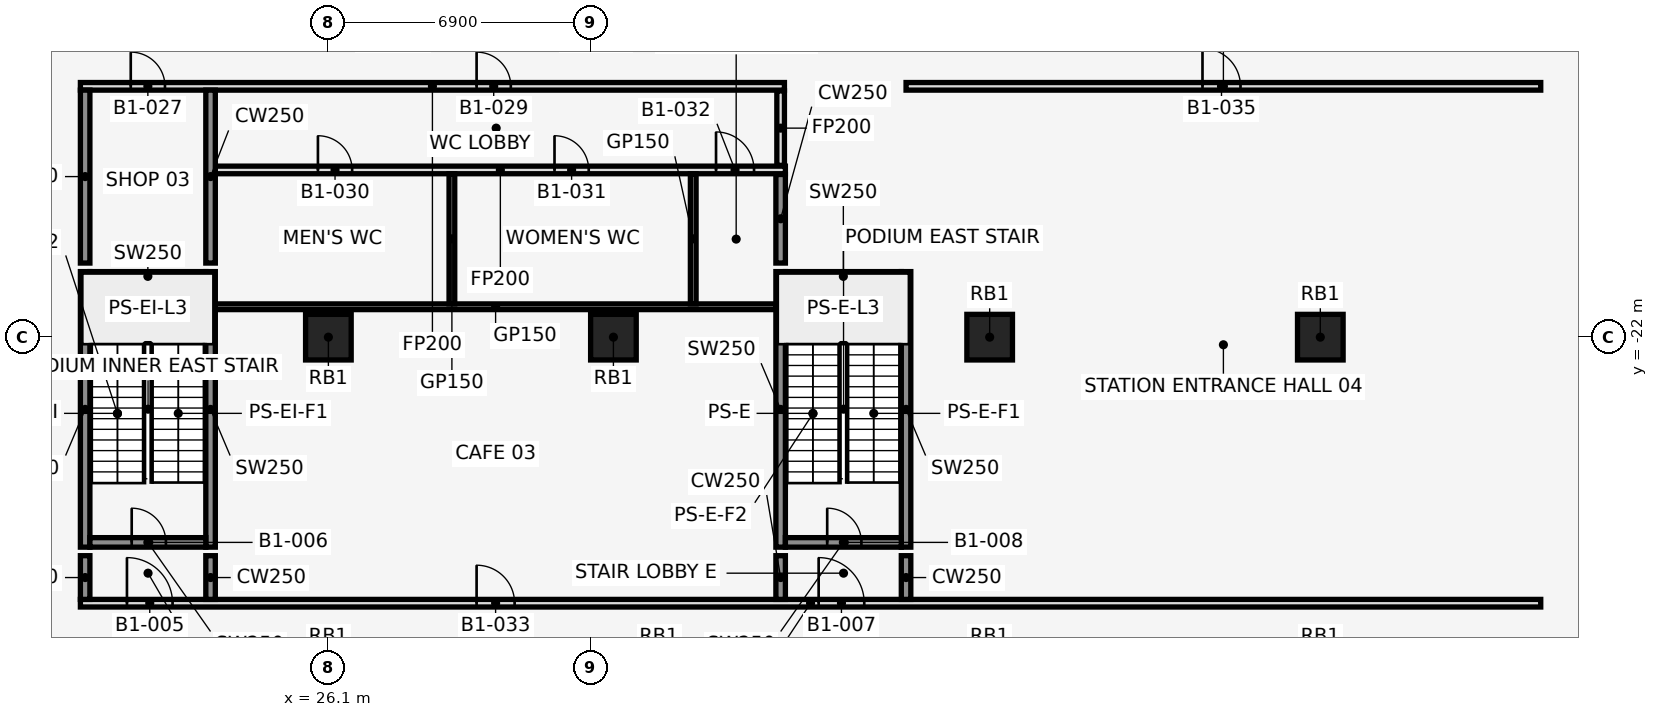
"""IFC4 building model, lengths in metres.
Left out: names, types, materials, properties, quantities, classifications, styles, units other than length and angle.
Written with IfcOpenShell. Run it as: python <this file> out.ifc"""

import sys

from ifc_helpers import new_model, si_unit, direction, frame, frame_2d, origin, origin_2d, place, context, subcontext, project, spatial, rectangle, extrude, element, fill, save


model = new_model("IFC4")
c1 = context("Model", 3, precision=1e-05, world=origin(), true_north=direction((0.0, 1.0)))
c2 = subcontext(c1, "Body", "Model", "MODEL_VIEW")
j1 = project(units=[si_unit("LENGTHUNIT", "METRE"), si_unit("PLANEANGLEUNIT", "RADIAN")], contexts=[c1])
p1 = place(None, origin())
s1 = spatial("IfcSite", under=j1, at=p1, CompositionType="ELEMENT")
p2 = place(p1, origin())
s2 = spatial("IfcBuilding", under=s1, at=p2, CompositionType="ELEMENT")
p3 = place(p2, frame((0.0, 0.0, -5.0)))
s3 = spatial("IfcBuildingStorey", under=s2, at=p3, CompositionType="ELEMENT", Elevation=-5.0)
for number, where, z_axis, x_axis in (
    (1, (33.6, -22.0, 0.0), (0.0, 0.0, 1.0), (1.0, 0.0, 0.0)),
    (2, (26.1, -22.0, 0.0), (0.0, 0.0, 1.0), (1.0, 0.0, 0.0)),
    (3, (43.5, -22.0, 0.0), (0.0, 0.0, 1.0), (1.0, 0.0, 0.0)),
    (4, (52.2, -22.0, 0.0), (0.0, 0.0, 1.0), (1.0, 0.0, 0.0)),
):
    element("IfcColumn", number, at=place(p3, frame(where, z_axis=z_axis, x_axis=x_axis)), inside=s3, PredefinedType="COLUMN", context=c2, shape_type="SweptSolid", body=[
        extrude(rectangle(XDim=1.2, YDim=1.2, at=origin_2d()), origin(), (0.0, 0.0, 1.0), 5.0),
    ])
for number, where, z_axis, x_axis in (
    (5, (19.7, -27.525, 0.0), (0.0, 0.0, 1.0), (0.0, 1.0, 0.0)),
    (6, (23.0, -27.525, 0.0), (0.0, 0.0, 1.0), (0.0, 1.0, 0.0)),
):
    element("IfcWall", number, at=place(p3, frame(where, z_axis=z_axis, x_axis=x_axis)), inside=s3, PredefinedType="SHEAR", context=c2, shape_type="SweptSolid", body=[
        extrude(rectangle(XDim=7.25, YDim=0.25, at=frame_2d((3.625, 0.0))), origin(), (0.0, 0.0, 1.0), 5.0),
    ])
p4 = place(p3, frame((19.825, -27.4, 0.0), z_axis=(0.0, 0.0, 1.0), x_axis=(1.0, 0.0, 0.0)))
e7 = element("IfcWall", 7, at=p4, inside=s3, PredefinedType="SHEAR", context=c2, shape_type="SweptSolid", body=[
    extrude(rectangle(XDim=3.05, YDim=0.25, at=frame_2d((1.525, 0.0))), origin(), (0.0, 0.0, 1.0), 5.0),
])
p5 = place(p4, frame((1.1, 0.0, 0.0)))
e8 = element("IfcOpeningElement", 8, at=p5, cuts=e7, PredefinedType="OPENING", context=c2, shape_type="SweptSolid", body=[
    extrude(rectangle(XDim=0.9, YDim=2.1, at=frame_2d((0.45, 1.05))), frame((0.0, 0.137, 0.0), z_axis=(0.0, -1.0, 0.0), x_axis=(1.0, 0.0, 0.0)), (0.0, 0.0, 1.0), 0.274),
])
p6 = place(p3, frame((19.825, -20.4, 0.0), z_axis=(0.0, 0.0, 1.0), x_axis=(1.0, 0.0, 0.0)))
e9 = element("IfcWall", 9, at=p6, inside=s3, PredefinedType="SHEAR", context=c2, shape_type="SweptSolid", body=[
    extrude(rectangle(XDim=3.05, YDim=0.25, at=frame_2d((1.525, 0.0))), origin(), (0.0, 0.0, 1.0), 5.0),
])
for number, where, z_axis, x_axis in (
    (10, (38.0, -27.525, 0.0), (0.0, 0.0, 1.0), (0.0, 1.0, 0.0)),
    (11, (41.3, -27.525, 0.0), (0.0, 0.0, 1.0), (0.0, 1.0, 0.0)),
):
    element("IfcWall", number, at=place(p3, frame(where, z_axis=z_axis, x_axis=x_axis)), inside=s3, PredefinedType="SHEAR", context=c2, shape_type="SweptSolid", body=[
        extrude(rectangle(XDim=7.25, YDim=0.25, at=frame_2d((3.625, 0.0))), origin(), (0.0, 0.0, 1.0), 5.0),
    ])
p7 = place(p3, frame((38.125, -27.4, 0.0), z_axis=(0.0, 0.0, 1.0), x_axis=(1.0, 0.0, 0.0)))
e12 = element("IfcWall", 12, at=p7, inside=s3, PredefinedType="SHEAR", context=c2, shape_type="SweptSolid", body=[
    extrude(rectangle(XDim=3.05, YDim=0.25, at=frame_2d((1.525, 0.0))), origin(), (0.0, 0.0, 1.0), 5.0),
])
p8 = place(p7, frame((1.1, 0.0, 0.0)))
e13 = element("IfcOpeningElement", 13, at=p8, cuts=e12, PredefinedType="OPENING", context=c2, shape_type="SweptSolid", body=[
    extrude(rectangle(XDim=0.9, YDim=2.1, at=frame_2d((0.45, 1.05))), frame((0.0, 0.137, 0.0), z_axis=(0.0, -1.0, 0.0), x_axis=(1.0, 0.0, 0.0)), (0.0, 0.0, 1.0), 0.274),
])
p9 = place(p3, frame((38.125, -20.4, 0.0), z_axis=(0.0, 0.0, 1.0), x_axis=(1.0, 0.0, 0.0)))
e14 = element("IfcWall", 14, at=p9, inside=s3, PredefinedType="SHEAR", context=c2, shape_type="SweptSolid", body=[
    extrude(rectangle(XDim=3.05, YDim=0.25, at=frame_2d((1.525, 0.0))), origin(), (0.0, 0.0, 1.0), 5.0),
])
p10 = place(p3, frame((19.575, -29.0, 0.0), z_axis=(0.0, 0.0, 1.0), x_axis=(1.0, 0.0, 0.0)))
e15 = element("IfcWall", 15, at=p10, inside=s3, PredefinedType="PARTITIONING", context=c2, shape_type="SweptSolid", body=[
    extrude(rectangle(XDim=38.425, YDim=0.2, at=frame_2d((19.212, 0.0))), origin(), (0.0, 0.0, 1.0), 4.7),
])
p11 = place(p10, frame((1.225, 0.0, 0.0)))
e16 = element("IfcOpeningElement", 16, at=p11, cuts=e15, PredefinedType="OPENING", context=c2, shape_type="SweptSolid", body=[
    extrude(rectangle(XDim=1.2, YDim=2.1, at=frame_2d((0.6, 1.05))), frame((0.0, 0.112, 0.0), z_axis=(0.0, -1.0, 0.0), x_axis=(1.0, 0.0, 0.0)), (0.0, 0.0, 1.0), 0.224),
])
p12 = place(p10, frame((19.425, 0.0, 0.0)))
e17 = element("IfcOpeningElement", 17, at=p12, cuts=e15, PredefinedType="OPENING", context=c2, shape_type="SweptSolid", body=[
    extrude(rectangle(XDim=1.2, YDim=2.1, at=frame_2d((0.6, 1.05))), frame((0.0, 0.112, 0.0), z_axis=(0.0, -1.0, 0.0), x_axis=(1.0, 0.0, 0.0)), (0.0, 0.0, 1.0), 0.224),
])
p13 = place(p10, frame((10.425, 0.0, 0.0)))
e18 = element("IfcOpeningElement", 18, at=p13, cuts=e15, PredefinedType="OPENING", context=c2, shape_type="SweptSolid", body=[
    extrude(rectangle(XDim=1.0, YDim=2.1, at=frame_2d((0.5, 1.05))), frame((0.0, 0.112, 0.0), z_axis=(0.0, -1.0, 0.0), x_axis=(1.0, 0.0, 0.0)), (0.0, 0.0, 1.0), 0.224),
])
p14 = place(p3, frame((23.125, -21.2, 0.0), z_axis=(0.0, 0.0, 1.0), x_axis=(1.0, 0.0, 0.0)))
e19 = element("IfcWall", 19, at=p14, inside=s3, PredefinedType="PARTITIONING", context=c2, shape_type="SweptSolid", body=[
    extrude(rectangle(XDim=14.75, YDim=0.15, at=frame_2d((7.375, 0.0))), origin(), (0.0, 0.0, 1.0), 4.7),
])
p15 = place(p3, frame((23.125, -17.6, 0.0), z_axis=(0.0, 0.0, 1.0), x_axis=(1.0, 0.0, 0.0)))
e20 = element("IfcWall", 20, at=p15, inside=s3, PredefinedType="PARTITIONING", context=c2, shape_type="SweptSolid", body=[
    extrude(rectangle(XDim=15.0, YDim=0.2, at=frame_2d((7.5, 0.0))), origin(), (0.0, 0.0, 1.0), 4.7),
])
p16 = place(p15, frame((2.7, 0.0, 0.0)))
e21 = element("IfcOpeningElement", 21, at=p16, cuts=e20, PredefinedType="OPENING", context=c2, shape_type="SweptSolid", body=[
    extrude(rectangle(XDim=0.9, YDim=2.1, at=frame_2d((0.45, 1.05))), frame((0.0, 0.112, 0.0), z_axis=(0.0, -1.0, 0.0), x_axis=(1.0, 0.0, 0.0)), (0.0, 0.0, 1.0), 0.224),
])
p17 = place(p15, frame((8.925, 0.0, 0.0)))
e22 = element("IfcOpeningElement", 22, at=p17, cuts=e20, PredefinedType="OPENING", context=c2, shape_type="SweptSolid", body=[
    extrude(rectangle(XDim=0.9, YDim=2.1, at=frame_2d((0.45, 1.05))), frame((0.0, 0.112, 0.0), z_axis=(0.0, -1.0, 0.0), x_axis=(1.0, 0.0, 0.0)), (0.0, 0.0, 1.0), 0.224),
])
p18 = place(p15, frame((13.175, 0.0, 0.0)))
e23 = element("IfcOpeningElement", 23, at=p18, cuts=e20, PredefinedType="OPENING", context=c2, shape_type="SweptSolid", body=[
    extrude(rectangle(XDim=1.0, YDim=2.1, at=frame_2d((0.5, 1.05))), frame((0.0, 0.112, 0.0), z_axis=(0.0, -1.0, 0.0), x_axis=(1.0, 0.0, 0.0)), (0.0, 0.0, 1.0), 0.224),
])
p19 = place(p3, frame((19.575, -15.4, 0.0), z_axis=(0.0, 0.0, 1.0), x_axis=(1.0, 0.0, 0.0)))
e24 = element("IfcWall", 24, at=p19, inside=s3, PredefinedType="PARTITIONING", context=c2, shape_type="SweptSolid", body=[
    extrude(rectangle(XDim=18.525, YDim=0.2, at=frame_2d((9.263, 0.0))), origin(), (0.0, 0.0, 1.0), 4.7),
])
p20 = place(p19, frame((1.325, 0.0, 0.0)))
e25 = element("IfcOpeningElement", 25, at=p20, cuts=e24, PredefinedType="OPENING", context=c2, shape_type="SweptSolid", body=[
    extrude(rectangle(XDim=0.9, YDim=2.1, at=frame_2d((0.45, 1.05))), frame((0.0, 0.112, 0.0), z_axis=(0.0, -1.0, 0.0), x_axis=(1.0, 0.0, 0.0)), (0.0, 0.0, 1.0), 0.224),
])
p21 = place(p19, frame((10.425, 0.0, 0.0)))
e26 = element("IfcOpeningElement", 26, at=p21, cuts=e24, PredefinedType="OPENING", context=c2, shape_type="SweptSolid", body=[
    extrude(rectangle(XDim=0.9, YDim=2.1, at=frame_2d((0.45, 1.05))), frame((0.0, 0.112, 0.0), z_axis=(0.0, -1.0, 0.0), x_axis=(1.0, 0.0, 0.0)), (0.0, 0.0, 1.0), 0.224),
])
p22 = place(p3, frame((41.3, -15.4, 0.0), z_axis=(0.0, 0.0, 1.0), x_axis=(1.0, 0.0, 0.0)))
e27 = element("IfcWall", 27, at=p22, inside=s3, PredefinedType="PARTITIONING", context=c2, shape_type="SweptSolid", body=[
    extrude(rectangle(XDim=16.7, YDim=0.2, at=frame_2d((8.35, 0.0))), origin(), (0.0, 0.0, 1.0), 4.7),
])
p23 = place(p22, frame((7.8, 0.0, 0.0)))
e28 = element("IfcOpeningElement", 28, at=p23, cuts=e27, PredefinedType="OPENING", context=c2, shape_type="SweptSolid", body=[
    extrude(rectangle(XDim=1.0, YDim=2.1, at=frame_2d((0.5, 1.05))), frame((0.0, 0.112, 0.0), z_axis=(0.0, -1.0, 0.0), x_axis=(1.0, 0.0, 0.0)), (0.0, 0.0, 1.0), 0.224),
])
p24 = place(p3, frame((19.7, -28.9, 0.0), z_axis=(0.0, 0.0, 1.0), x_axis=(0.0, 1.0, 0.0)))
e29 = element("IfcWall", 29, at=p24, inside=s3, PredefinedType="SHEAR", context=c2, shape_type="SweptSolid", body=[
    extrude(rectangle(XDim=1.15, YDim=0.25, at=frame_2d((0.575, 0.0))), origin(), (0.0, 0.0, 1.0), 5.0),
])
p25 = place(p3, frame((19.7, -20.05, 0.0), z_axis=(0.0, 0.0, 1.0), x_axis=(0.0, 1.0, 0.0)))
e30 = element("IfcWall", 30, at=p25, inside=s3, PredefinedType="SHEAR", context=c2, shape_type="SweptSolid", body=[
    extrude(rectangle(XDim=4.55, YDim=0.25, at=frame_2d((2.275, 0.0))), origin(), (0.0, 0.0, 1.0), 5.0),
])
p26 = place(p3, frame((23.0, -28.9, 0.0), z_axis=(0.0, 0.0, 1.0), x_axis=(0.0, 1.0, 0.0)))
e31 = element("IfcWall", 31, at=p26, inside=s3, PredefinedType="SHEAR", context=c2, shape_type="SweptSolid", body=[
    extrude(rectangle(XDim=1.15, YDim=0.25, at=frame_2d((0.575, 0.0))), origin(), (0.0, 0.0, 1.0), 5.0),
])
p27 = place(p3, frame((23.0, -20.05, 0.0), z_axis=(0.0, 0.0, 1.0), x_axis=(0.0, 1.0, 0.0)))
e32 = element("IfcWall", 32, at=p27, inside=s3, PredefinedType="SHEAR", context=c2, shape_type="SweptSolid", body=[
    extrude(rectangle(XDim=4.55, YDim=0.25, at=frame_2d((2.275, 0.0))), origin(), (0.0, 0.0, 1.0), 5.0),
])
for number, where, z_axis, x_axis in (
    (33, (29.35, -21.125, 0.0), (0.0, 0.0, 1.0), (0.0, 1.0, 0.0)),
    (34, (35.7, -21.125, 0.0), (0.0, 0.0, 1.0), (0.0, 1.0, 0.0)),
):
    element("IfcWall", number, at=place(p3, frame(where, z_axis=z_axis, x_axis=x_axis)), inside=s3, PredefinedType="PARTITIONING", context=c2, shape_type="SweptSolid", body=[
        extrude(rectangle(XDim=3.425, YDim=0.15, at=frame_2d((1.712, 0.0))), origin(), (0.0, 0.0, 1.0), 4.7),
    ])
p28 = place(p3, frame((38.0, -28.9, 0.0), z_axis=(0.0, 0.0, 1.0), x_axis=(0.0, 1.0, 0.0)))
e35 = element("IfcWall", 35, at=p28, inside=s3, PredefinedType="SHEAR", context=c2, shape_type="SweptSolid", body=[
    extrude(rectangle(XDim=1.15, YDim=0.25, at=frame_2d((0.575, 0.0))), origin(), (0.0, 0.0, 1.0), 5.0),
])
p29 = place(p3, frame((38.0, -20.05, 0.0), z_axis=(0.0, 0.0, 1.0), x_axis=(0.0, 1.0, 0.0)))
e36 = element("IfcWall", 36, at=p29, inside=s3, PredefinedType="SHEAR", context=c2, shape_type="SweptSolid", body=[
    extrude(rectangle(XDim=2.33, YDim=0.25, at=frame_2d((1.165, 0.0))), origin(), (0.0, 0.0, 1.0), 5.0),
])
p30 = place(p3, frame((38.0, -17.48, 0.0), z_axis=(0.0, 0.0, 1.0), x_axis=(0.0, 1.0, 0.0)))
e37 = element("IfcWall", 37, at=p30, inside=s3, PredefinedType="PARTITIONING", context=c2, shape_type="SweptSolid", body=[
    extrude(rectangle(XDim=1.96, YDim=0.2, at=frame_2d((0.98, 0.0))), origin(), (0.0, 0.0, 1.0), 4.7),
])
p31 = place(p3, frame((41.3, -28.9, 0.0), z_axis=(0.0, 0.0, 1.0), x_axis=(0.0, 1.0, 0.0)))
e38 = element("IfcWall", 38, at=p31, inside=s3, PredefinedType="SHEAR", context=c2, shape_type="SweptSolid", body=[
    extrude(rectangle(XDim=1.15, YDim=0.25, at=frame_2d((0.575, 0.0))), origin(), (0.0, 0.0, 1.0), 5.0),
])
p32 = place(p11, origin())
e39 = element("IfcDoor", 39, at=p32, inside=s3, OperationType="SINGLE_SWING_LEFT", PredefinedType="DOOR", context=c2, shape_type="SweptSolid", body=[
    extrude(rectangle(XDim=1.2, YDim=2.1, at=frame_2d((0.6, 1.05))), frame((0.0, 0.025, 0.0), z_axis=(0.0, -1.0, 0.0), x_axis=(1.0, 0.0, 0.0)), (0.0, 0.0, 1.0), 0.05),
])
fill(e16, e39)
p33 = place(p5, origin())
e40 = element("IfcDoor", 40, at=p33, inside=s3, OperationType="SINGLE_SWING_RIGHT", PredefinedType="DOOR", context=c2, shape_type="SweptSolid", body=[
    extrude(rectangle(XDim=0.9, YDim=2.1, at=frame_2d((0.45, 1.05))), frame((0.0, 0.025, 0.0), z_axis=(0.0, -1.0, 0.0), x_axis=(1.0, 0.0, 0.0)), (0.0, 0.0, 1.0), 0.05),
])
fill(e8, e40)
p34 = place(p12, origin())
e41 = element("IfcDoor", 41, at=p34, inside=s3, OperationType="SINGLE_SWING_LEFT", PredefinedType="DOOR", context=c2, shape_type="SweptSolid", body=[
    extrude(rectangle(XDim=1.2, YDim=2.1, at=frame_2d((0.6, 1.05))), frame((0.0, 0.025, 0.0), z_axis=(0.0, -1.0, 0.0), x_axis=(1.0, 0.0, 0.0)), (0.0, 0.0, 1.0), 0.05),
])
fill(e17, e41)
p35 = place(p8, origin())
e42 = element("IfcDoor", 42, at=p35, inside=s3, OperationType="SINGLE_SWING_LEFT", PredefinedType="DOOR", context=c2, shape_type="SweptSolid", body=[
    extrude(rectangle(XDim=0.9, YDim=2.1, at=frame_2d((0.45, 1.05))), frame((0.0, 0.025, 0.0), z_axis=(0.0, -1.0, 0.0), x_axis=(1.0, 0.0, 0.0)), (0.0, 0.0, 1.0), 0.05),
])
fill(e13, e42)
p36 = place(p20, frame((0.9, 0.0, 0.0), z_axis=(0.0, 0.0, 1.0), x_axis=(-1.0, 0.0, 0.0)))
e43 = element("IfcDoor", 43, at=p36, inside=s3, OperationType="SINGLE_SWING_RIGHT", PredefinedType="DOOR", context=c2, shape_type="SweptSolid", body=[
    extrude(rectangle(XDim=0.9, YDim=2.1, at=frame_2d((0.45, 1.05))), frame((0.0, 0.025, 0.0), z_axis=(0.0, -1.0, 0.0), x_axis=(1.0, 0.0, 0.0)), (0.0, 0.0, 1.0), 0.05),
])
fill(e25, e43)
p37 = place(p21, frame((0.9, 0.0, 0.0), z_axis=(0.0, 0.0, 1.0), x_axis=(-1.0, 0.0, 0.0)))
e44 = element("IfcDoor", 44, at=p37, inside=s3, OperationType="SINGLE_SWING_RIGHT", PredefinedType="DOOR", context=c2, shape_type="SweptSolid", body=[
    extrude(rectangle(XDim=0.9, YDim=2.1, at=frame_2d((0.45, 1.05))), frame((0.0, 0.025, 0.0), z_axis=(0.0, -1.0, 0.0), x_axis=(1.0, 0.0, 0.0)), (0.0, 0.0, 1.0), 0.05),
])
fill(e26, e44)
p38 = place(p16, frame((0.9, 0.0, 0.0), z_axis=(0.0, 0.0, 1.0), x_axis=(-1.0, 0.0, 0.0)))
e45 = element("IfcDoor", 45, at=p38, inside=s3, OperationType="SINGLE_SWING_RIGHT", PredefinedType="DOOR", context=c2, shape_type="SweptSolid", body=[
    extrude(rectangle(XDim=0.9, YDim=2.1, at=frame_2d((0.45, 1.05))), frame((0.0, 0.025, 0.0), z_axis=(0.0, -1.0, 0.0), x_axis=(1.0, 0.0, 0.0)), (0.0, 0.0, 1.0), 0.05),
])
fill(e21, e45)
p39 = place(p17, frame((0.9, 0.0, 0.0), z_axis=(0.0, 0.0, 1.0), x_axis=(-1.0, 0.0, 0.0)))
e46 = element("IfcDoor", 46, at=p39, inside=s3, OperationType="SINGLE_SWING_LEFT", PredefinedType="DOOR", context=c2, shape_type="SweptSolid", body=[
    extrude(rectangle(XDim=0.9, YDim=2.1, at=frame_2d((0.45, 1.05))), frame((0.0, 0.025, 0.0), z_axis=(0.0, -1.0, 0.0), x_axis=(1.0, 0.0, 0.0)), (0.0, 0.0, 1.0), 0.05),
])
fill(e22, e46)
p40 = place(p18, frame((1.0, 0.0, 0.0), z_axis=(0.0, 0.0, 1.0), x_axis=(-1.0, 0.0, 0.0)))
e47 = element("IfcDoor", 47, at=p40, inside=s3, OperationType="SINGLE_SWING_RIGHT", PredefinedType="DOOR", context=c2, shape_type="SweptSolid", body=[
    extrude(rectangle(XDim=1.0, YDim=2.1, at=frame_2d((0.5, 1.05))), frame((0.0, 0.025, 0.0), z_axis=(0.0, -1.0, 0.0), x_axis=(1.0, 0.0, 0.0)), (0.0, 0.0, 1.0), 0.05),
])
fill(e23, e47)
p41 = place(p13, origin())
e48 = element("IfcDoor", 48, at=p41, inside=s3, OperationType="SINGLE_SWING_RIGHT", PredefinedType="DOOR", context=c2, shape_type="SweptSolid", body=[
    extrude(rectangle(XDim=1.0, YDim=2.1, at=frame_2d((0.5, 1.05))), frame((0.0, 0.025, 0.0), z_axis=(0.0, -1.0, 0.0), x_axis=(1.0, 0.0, 0.0)), (0.0, 0.0, 1.0), 0.05),
])
fill(e18, e48)
p42 = place(p23, frame((1.0, 0.0, 0.0), z_axis=(0.0, 0.0, 1.0), x_axis=(-1.0, 0.0, 0.0)))
e49 = element("IfcDoor", 49, at=p42, inside=s3, OperationType="SINGLE_SWING_RIGHT", PredefinedType="DOOR", context=c2, shape_type="SweptSolid", body=[
    extrude(rectangle(XDim=1.0, YDim=2.1, at=frame_2d((0.5, 1.05))), frame((0.0, 0.025, 0.0), z_axis=(0.0, -1.0, 0.0), x_axis=(1.0, 0.0, 0.0)), (0.0, 0.0, 1.0), 0.05),
])
fill(e28, e49)
save(model, sys.argv[1])
